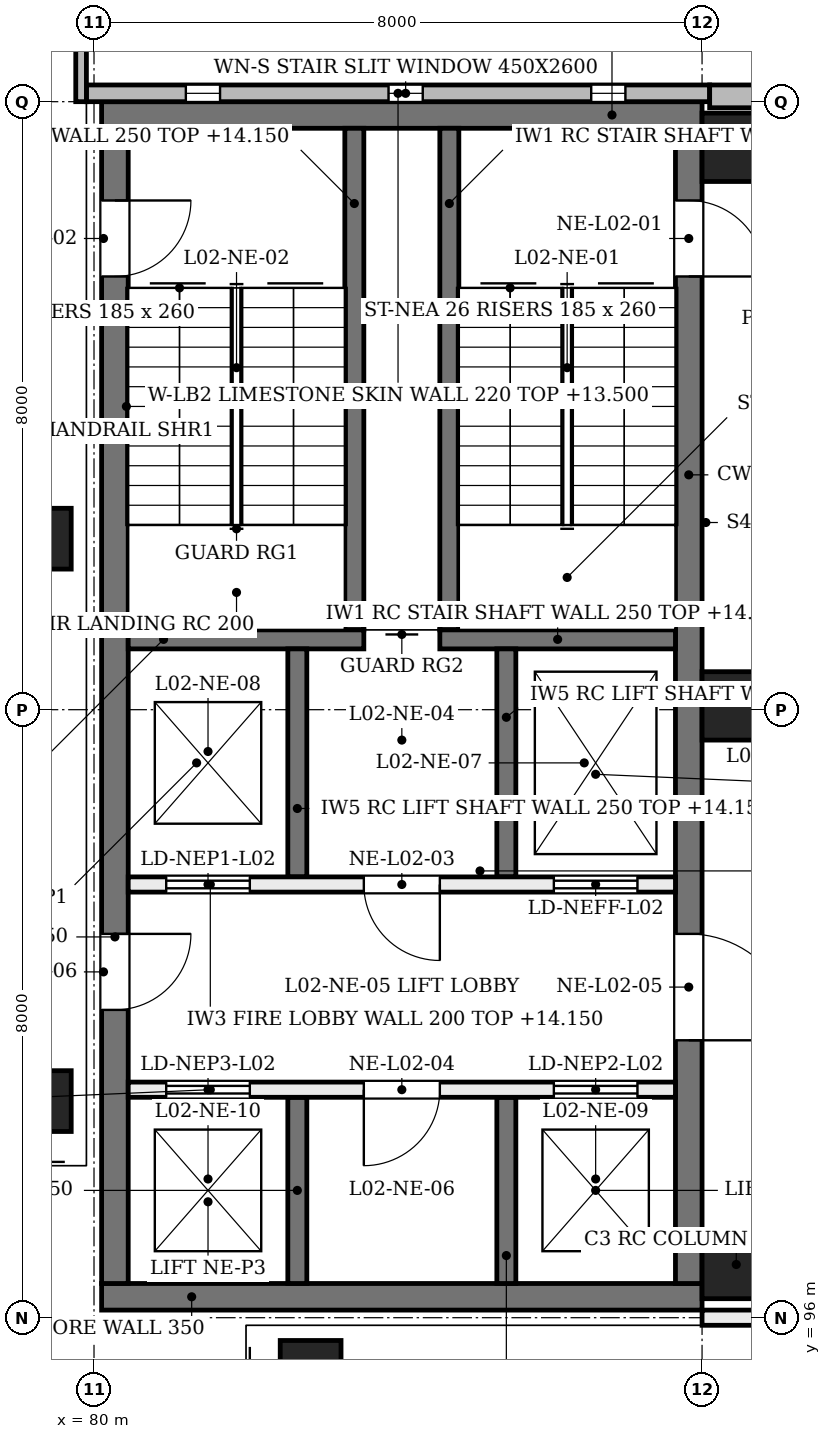
"""IFC4 building model, lengths in metres.
Left out: names, types, materials, properties, quantities, classifications, styles, units other than length and angle.
Written with IfcOpenShell. Run it as: python <this file> out.ifc"""

import sys

from ifc_helpers import new_model, si_unit, direction, frame, frame_2d, origin, origin_2d, place, context, subcontext, project, spatial, rectangle, extrude, element, fill, save


model = new_model("IFC4")
c1 = context("Model", 3, precision=1e-05, world=origin(), true_north=direction((0.0, 1.0)))
c2 = subcontext(c1, "Body", "Model", "MODEL_VIEW")
j1 = project(units=[si_unit("LENGTHUNIT", "METRE"), si_unit("PLANEANGLEUNIT", "RADIAN")], contexts=[c1])
p1 = place(None, origin())
s1 = spatial("IfcSite", under=j1, at=p1, CompositionType="ELEMENT")
p2 = place(p1, origin())
s2 = spatial("IfcBuilding", under=s1, at=p2, CompositionType="ELEMENT")
p3 = place(p2, frame((0.0, 0.0, 9.6)))
s3 = spatial("IfcBuildingStorey", under=s2, at=p3, CompositionType="ELEMENT", Elevation=9.6)
for number, where, z_axis, x_axis in (
    (1, (80.1, 96.275, 0.0), (0.0, 0.0, 1.0), (1.0, 0.0, 0.0)),
    (2, (80.1, 111.825, 0.0), (0.0, 0.0, 1.0), (1.0, 0.0, 0.0)),
):
    element("IfcWall", number, at=place(p3, frame(where, z_axis=z_axis, x_axis=x_axis)), inside=s3, PredefinedType="SHEAR", context=c2, shape_type="SweptSolid", body=[
        extrude(rectangle(XDim=7.9, YDim=0.35, at=frame_2d((3.95, 0.0))), origin(), (0.0, 0.0, 1.0), 4.58),
    ])
p4 = place(p3, frame((80.275, 96.45, 0.0), z_axis=(0.0, 0.0, 1.0), x_axis=(0.0, 1.0, 0.0)))
e3 = element("IfcWall", 3, at=p4, inside=s3, PredefinedType="SHEAR", context=c2, shape_type="SweptSolid", body=[
    extrude(rectangle(XDim=15.2, YDim=0.35, at=frame_2d((7.6, 0.0))), origin(), (0.0, 0.0, 1.0), 4.58),
])
p5 = place(p4, frame((13.25, 0.0, 0.0)))
e4 = element("IfcOpeningElement", 4, at=p5, cuts=e3, PredefinedType="OPENING", context=c2, shape_type="SweptSolid", body=[
    extrude(rectangle(XDim=1.0, YDim=2.1, at=frame_2d((0.5, 1.05))), frame((0.0, 0.185, 0.0), z_axis=(0.0, -1.0, 0.0), x_axis=(1.0, 0.0, 0.0)), (0.0, 0.0, 1.0), 0.37),
])
p6 = place(p4, frame((3.6, 0.0, 0.0)))
e5 = element("IfcOpeningElement", 5, at=p6, cuts=e3, PredefinedType="OPENING", context=c2, shape_type="SweptSolid", body=[
    extrude(rectangle(XDim=1.0, YDim=2.1, at=frame_2d((0.5, 1.05))), frame((0.0, 0.185, 0.0), z_axis=(0.0, -1.0, 0.0), x_axis=(1.0, 0.0, 0.0)), (0.0, 0.0, 1.0), 0.37),
])
p7 = place(p3, frame((87.825, 96.45, 0.0), z_axis=(0.0, 0.0, 1.0), x_axis=(0.0, 1.0, 0.0)))
e6 = element("IfcWall", 6, at=p7, inside=s3, PredefinedType="SHEAR", context=c2, shape_type="SweptSolid", body=[
    extrude(rectangle(XDim=15.2, YDim=0.35, at=frame_2d((7.6, 0.0))), origin(), (0.0, 0.0, 1.0), 4.58),
])
p8 = place(p7, frame((13.25, 0.0, 0.0)))
e7 = element("IfcOpeningElement", 7, at=p8, cuts=e6, PredefinedType="OPENING", context=c2, shape_type="SweptSolid", body=[
    extrude(rectangle(XDim=1.0, YDim=2.1, at=frame_2d((0.5, 1.05))), frame((0.0, 0.185, 0.0), z_axis=(0.0, -1.0, 0.0), x_axis=(1.0, 0.0, 0.0)), (0.0, 0.0, 1.0), 0.37),
])
p9 = place(p7, frame((3.2, 0.0, 0.0)))
e8 = element("IfcOpeningElement", 8, at=p9, cuts=e6, PredefinedType="OPENING", context=c2, shape_type="SweptSolid", body=[
    extrude(rectangle(XDim=1.4, YDim=2.1, at=frame_2d((0.7, 1.05))), frame((0.0, 0.185, 0.0), z_axis=(0.0, -1.0, 0.0), x_axis=(1.0, 0.0, 0.0)), (0.0, 0.0, 1.0), 0.37),
])
for number, where, z_axis, x_axis in (
    (9, (88.45, 96.7, 0.0), (0.0, 0.0, 1.0), (1.0, 0.0, 0.0)),
    (10, (88.45, 104.05, 0.0), (0.0, 0.0, 1.0), (1.0, 0.0, 0.0)),
    (11, (88.45, 111.4, 0.0), (0.0, 0.0, 1.0), (1.0, 0.0, 0.0)),
):
    element("IfcColumn", number, at=place(p3, frame(where, z_axis=z_axis, x_axis=x_axis)), inside=s3, PredefinedType="COLUMN", context=c2, shape_type="SweptSolid", body=[
        extrude(rectangle(XDim=0.9, YDim=0.9, at=origin_2d()), origin(), (0.0, 0.0, 1.0), 4.8),
    ])
for number, where, z_axis, x_axis in (
    (12, (79.3, 98.6, 0.0), (0.0, 0.204, 0.979), (-1.0, 0.0, 0.0)),
    (13, (79.3, 106.0, 0.0), (0.0, 0.204, 0.979), (-1.0, 0.0, 0.0)),
    (14, (82.6, 95.3, 0.0), (0.204, 0.0, 0.979), (0.0, 1.0, 0.0)),
):
    element("IfcColumn", number, at=place(p3, frame(where, z_axis=z_axis, x_axis=x_axis)), inside=s3, PredefinedType="COLUMN", context=c2, shape_type="SweptSolid", body=[
        extrude(rectangle(XDim=0.8, YDim=0.8, at=origin_2d()), origin(), (0.0, 0.0, 1.0), 4.903),
    ])
p10 = place(p3, frame((79.9, 112.11, 0.0), z_axis=(0.0, 0.0, 1.0), x_axis=(1.0, 0.0, 0.0)))
e15 = element("IfcWall", 15, at=p10, inside=s3, PredefinedType="SOLIDWALL", context=c2, shape_type="SweptSolid", body=[
    extrude(rectangle(XDim=8.2, YDim=0.22, at=frame_2d((4.1, 0.0))), origin(), (0.0, 0.0, 1.0), 3.9),
])
p11 = place(p10, frame((1.308, 0.0, 0.9)))
e16 = element("IfcOpeningElement", 16, at=p11, cuts=e15, PredefinedType="OPENING", context=c2, shape_type="SweptSolid", body=[
    extrude(rectangle(XDim=0.45, YDim=2.6, at=frame_2d((0.225, 1.3))), frame((0.0, 0.12, 0.0), z_axis=(0.0, -1.0, 0.0), x_axis=(1.0, 0.0, 0.0)), (0.0, 0.0, 1.0), 0.24),
])
p12 = place(p10, frame((3.975, 0.0, 0.9)))
e17 = element("IfcOpeningElement", 17, at=p12, cuts=e15, PredefinedType="OPENING", context=c2, shape_type="SweptSolid", body=[
    extrude(rectangle(XDim=0.45, YDim=2.6, at=frame_2d((0.225, 1.3))), frame((0.0, 0.12, 0.0), z_axis=(0.0, -1.0, 0.0), x_axis=(1.0, 0.0, 0.0)), (0.0, 0.0, 1.0), 0.24),
])
p13 = place(p10, frame((6.642, 0.0, 0.9)))
e18 = element("IfcOpeningElement", 18, at=p13, cuts=e15, PredefinedType="OPENING", context=c2, shape_type="SweptSolid", body=[
    extrude(rectangle(XDim=0.45, YDim=2.6, at=frame_2d((0.225, 1.3))), frame((0.0, 0.12, 0.0), z_axis=(0.0, -1.0, 0.0), x_axis=(1.0, 0.0, 0.0)), (0.0, 0.0, 1.0), 0.24),
])
p14 = place(p3, frame((88.1, 112.07, 0.0), z_axis=(0.0, 0.0, 1.0), x_axis=(1.0, 0.0, 0.0)))
e19 = element("IfcWall", 19, at=p14, inside=s3, PredefinedType="SOLIDWALL", context=c2, shape_type="SweptSolid", body=[
    extrude(rectangle(XDim=7.9, YDim=0.3, at=frame_2d((3.95, 0.0))), origin(), (0.0, 0.0, 1.0), 3.9),
])
p15 = place(p14, frame((0.717, 0.0, 0.75)))
e20 = element("IfcOpeningElement", 20, at=p15, cuts=e19, PredefinedType="OPENING", context=c2, shape_type="SweptSolid", body=[
    extrude(rectangle(XDim=1.2, YDim=3.1, at=frame_2d((0.6, 1.55))), frame((0.0, 0.16, 0.0), z_axis=(0.0, -1.0, 0.0), x_axis=(1.0, 0.0, 0.0)), (0.0, 0.0, 1.0), 0.32),
])
p16 = place(p14, frame((3.35, 0.0, 0.75)))
e21 = element("IfcOpeningElement", 21, at=p16, cuts=e19, PredefinedType="OPENING", context=c2, shape_type="SweptSolid", body=[
    extrude(rectangle(XDim=1.2, YDim=3.1, at=frame_2d((0.6, 1.55))), frame((0.0, 0.16, 0.0), z_axis=(0.0, -1.0, 0.0), x_axis=(1.0, 0.0, 0.0)), (0.0, 0.0, 1.0), 0.32),
])
p17 = place(p14, frame((5.983, 0.0, 0.75)))
e22 = element("IfcOpeningElement", 22, at=p17, cuts=e19, PredefinedType="OPENING", context=c2, shape_type="SweptSolid", body=[
    extrude(rectangle(XDim=1.2, YDim=3.1, at=frame_2d((0.6, 1.55))), frame((0.0, 0.16, 0.0), z_axis=(0.0, -1.0, 0.0), x_axis=(1.0, 0.0, 0.0)), (0.0, 0.0, 1.0), 0.32),
])
p18 = place(p3, frame((79.83, 112.0, 0.0), z_axis=(0.0, 0.0, 1.0), x_axis=(0.0, 1.0, 0.0)))
e23 = element("IfcWall", 23, at=p18, inside=s3, PredefinedType="SOLIDWALL", context=c2, shape_type="SweptSolid", body=[
    extrude(rectangle(XDim=2.0, YDim=0.14, at=frame_2d((1.0, 0.0))), origin(), (0.0, 0.0, 1.0), 3.9),
])
for number, where, z_axis, x_axis in (
    (24, (84.675, 111.65, 0.0), (0.0, 0.0, 1.0), (0.0, -1.0, 0.0)),
    (25, (83.425, 111.65, 0.0), (0.0, 0.0, 1.0), (0.0, -1.0, 0.0)),
):
    element("IfcWall", number, at=place(p3, frame(where, z_axis=z_axis, x_axis=x_axis)), inside=s3, PredefinedType="SOLIDWALL", context=c2, shape_type="SweptSolid", body=[
        extrude(rectangle(XDim=6.6, YDim=0.25, at=frame_2d((3.3, 0.0))), origin(), (0.0, 0.0, 1.0), 4.55),
    ])
p19 = place(p3, frame((87.65, 104.925, 0.0), z_axis=(0.0, 0.0, 1.0), x_axis=(-1.0, 0.0, 0.0)))
e26 = element("IfcWall", 26, at=p19, inside=s3, PredefinedType="SOLIDWALL", context=c2, shape_type="SweptSolid", body=[
    extrude(rectangle(XDim=3.1, YDim=0.25, at=frame_2d((1.55, 0.0))), origin(), (0.0, 0.0, 1.0), 4.55),
])
p20 = place(p3, frame((83.55, 104.925, 0.0), z_axis=(0.0, 0.0, 1.0), x_axis=(-1.0, 0.0, 0.0)))
e27 = element("IfcWall", 27, at=p20, inside=s3, PredefinedType="SOLIDWALL", context=c2, shape_type="SweptSolid", body=[
    extrude(rectangle(XDim=3.1, YDim=0.25, at=frame_2d((1.55, 0.0))), origin(), (0.0, 0.0, 1.0), 4.55),
])
p21 = place(p3, frame((85.425, 104.8, 0.0), z_axis=(0.0, 0.0, 1.0), x_axis=(0.0, -1.0, 0.0)))
e28 = element("IfcWall", 28, at=p21, inside=s3, PredefinedType="SOLIDWALL", context=c2, shape_type="SweptSolid", body=[
    extrude(rectangle(XDim=3.0, YDim=0.25, at=frame_2d((1.5, 0.0))), origin(), (0.0, 0.0, 1.0), 4.55),
])
p22 = place(p3, frame((85.425, 98.9, 0.0), z_axis=(0.0, 0.0, 1.0), x_axis=(0.0, -1.0, 0.0)))
e29 = element("IfcWall", 29, at=p22, inside=s3, PredefinedType="SOLIDWALL", context=c2, shape_type="SweptSolid", body=[
    extrude(rectangle(XDim=2.45, YDim=0.25, at=frame_2d((1.225, 0.0))), origin(), (0.0, 0.0, 1.0), 4.55),
])
p23 = place(p3, frame((82.675, 104.8, 0.0), z_axis=(0.0, 0.0, 1.0), x_axis=(0.0, -1.0, 0.0)))
e30 = element("IfcWall", 30, at=p23, inside=s3, PredefinedType="SOLIDWALL", context=c2, shape_type="SweptSolid", body=[
    extrude(rectangle(XDim=3.0, YDim=0.25, at=frame_2d((1.5, 0.0))), origin(), (0.0, 0.0, 1.0), 4.55),
])
p24 = place(p3, frame((82.675, 98.9, 0.0), z_axis=(0.0, 0.0, 1.0), x_axis=(0.0, -1.0, 0.0)))
e31 = element("IfcWall", 31, at=p24, inside=s3, PredefinedType="SOLIDWALL", context=c2, shape_type="SweptSolid", body=[
    extrude(rectangle(XDim=2.45, YDim=0.25, at=frame_2d((1.225, 0.0))), origin(), (0.0, 0.0, 1.0), 4.55),
])
p25 = place(p3, frame((87.65, 101.7, 0.0), z_axis=(0.0, 0.0, 1.0), x_axis=(-1.0, 0.0, 0.0)))
e32 = element("IfcWall", 32, at=p25, inside=s3, PredefinedType="SOLIDWALL", context=c2, shape_type="SweptSolid", body=[
    extrude(rectangle(XDim=7.2, YDim=0.2, at=frame_2d((3.6, 0.0))), origin(), (0.0, 0.0, 1.0), 4.55),
])
p26 = place(p25, frame((0.5, 0.0, 0.0)))
e33 = element("IfcOpeningElement", 33, at=p26, cuts=e32, PredefinedType="OPENING", context=c2, shape_type="SweptSolid", body=[
    extrude(rectangle(XDim=1.1, YDim=2.1, at=frame_2d((0.55, 1.05))), frame((0.0, 0.11, 0.0), z_axis=(0.0, -1.0, 0.0), x_axis=(1.0, 0.0, 0.0)), (0.0, 0.0, 1.0), 0.22),
])
p27 = place(p25, frame((5.6, 0.0, 0.0)))
e34 = element("IfcOpeningElement", 34, at=p27, cuts=e32, PredefinedType="OPENING", context=c2, shape_type="SweptSolid", body=[
    extrude(rectangle(XDim=1.1, YDim=2.1, at=frame_2d((0.55, 1.05))), frame((0.0, 0.11, 0.0), z_axis=(0.0, -1.0, 0.0), x_axis=(1.0, 0.0, 0.0)), (0.0, 0.0, 1.0), 0.22),
])
p28 = place(p25, frame((3.1, 0.0, 0.0)))
e35 = element("IfcOpeningElement", 35, at=p28, cuts=e32, PredefinedType="OPENING", context=c2, shape_type="SweptSolid", body=[
    extrude(rectangle(XDim=1.0, YDim=2.1, at=frame_2d((0.5, 1.05))), frame((0.0, 0.11, 0.0), z_axis=(0.0, -1.0, 0.0), x_axis=(1.0, 0.0, 0.0)), (0.0, 0.0, 1.0), 0.22),
])
p29 = place(p3, frame((87.65, 99.0, 0.0), z_axis=(0.0, 0.0, 1.0), x_axis=(-1.0, 0.0, 0.0)))
e36 = element("IfcWall", 36, at=p29, inside=s3, PredefinedType="SOLIDWALL", context=c2, shape_type="SweptSolid", body=[
    extrude(rectangle(XDim=7.2, YDim=0.2, at=frame_2d((3.6, 0.0))), origin(), (0.0, 0.0, 1.0), 4.55),
])
p30 = place(p29, frame((0.5, 0.0, 0.0)))
e37 = element("IfcOpeningElement", 37, at=p30, cuts=e36, PredefinedType="OPENING", context=c2, shape_type="SweptSolid", body=[
    extrude(rectangle(XDim=1.1, YDim=2.1, at=frame_2d((0.55, 1.05))), frame((0.0, 0.11, 0.0), z_axis=(0.0, -1.0, 0.0), x_axis=(1.0, 0.0, 0.0)), (0.0, 0.0, 1.0), 0.22),
])
p31 = place(p29, frame((5.6, 0.0, 0.0)))
e38 = element("IfcOpeningElement", 38, at=p31, cuts=e36, PredefinedType="OPENING", context=c2, shape_type="SweptSolid", body=[
    extrude(rectangle(XDim=1.1, YDim=2.1, at=frame_2d((0.55, 1.05))), frame((0.0, 0.11, 0.0), z_axis=(0.0, -1.0, 0.0), x_axis=(1.0, 0.0, 0.0)), (0.0, 0.0, 1.0), 0.22),
])
p32 = place(p29, frame((3.1, 0.0, 0.0)))
e39 = element("IfcOpeningElement", 39, at=p32, cuts=e36, PredefinedType="OPENING", context=c2, shape_type="SweptSolid", body=[
    extrude(rectangle(XDim=1.0, YDim=2.1, at=frame_2d((0.5, 1.05))), frame((0.0, 0.11, 0.0), z_axis=(0.0, -1.0, 0.0), x_axis=(1.0, 0.0, 0.0)), (0.0, 0.0, 1.0), 0.22),
])
p33 = place(p3, frame((88.0, 96.0, 0.0), z_axis=(0.0, 0.0, 1.0), x_axis=(1.0, 0.0, 0.0)))
e40 = element("IfcWall", 40, at=p33, inside=s3, PredefinedType="PARTITIONING", context=c2, shape_type="SweptSolid", body=[
    extrude(rectangle(XDim=3.6, YDim=0.2, at=frame_2d((1.8, 0.0))), origin(), (0.0, 0.0, 1.0), 3.88),
])
p34 = place(p33, frame((0.9, 0.0, 0.0)))
e41 = element("IfcOpeningElement", 41, at=p34, cuts=e40, PredefinedType="OPENING", context=c2, shape_type="SweptSolid", body=[
    extrude(rectangle(XDim=0.9, YDim=2.1, at=frame_2d((0.45, 1.05))), frame((0.0, 0.11, 0.0), z_axis=(0.0, -1.0, 0.0), x_axis=(1.0, 0.0, 0.0)), (0.0, 0.0, 1.0), 0.22),
])
p35 = place(p11, origin())
e42 = element("IfcWindow", 42, at=p35, inside=s3, PartitioningType="SINGLE_PANEL", PredefinedType="WINDOW", context=c2, shape_type="SweptSolid", body=[
    extrude(rectangle(XDim=0.45, YDim=2.6, at=frame_2d((0.225, 1.3))), frame((0.0, 0.03, 0.0), z_axis=(0.0, -1.0, 0.0), x_axis=(1.0, 0.0, 0.0)), (0.0, 0.0, 1.0), 0.06),
])
fill(e16, e42)
p36 = place(p12, origin())
e43 = element("IfcWindow", 43, at=p36, inside=s3, PartitioningType="SINGLE_PANEL", PredefinedType="WINDOW", context=c2, shape_type="SweptSolid", body=[
    extrude(rectangle(XDim=0.45, YDim=2.6, at=frame_2d((0.225, 1.3))), frame((0.0, 0.03, 0.0), z_axis=(0.0, -1.0, 0.0), x_axis=(1.0, 0.0, 0.0)), (0.0, 0.0, 1.0), 0.06),
])
fill(e17, e43)
p37 = place(p13, origin())
e44 = element("IfcWindow", 44, at=p37, inside=s3, PartitioningType="SINGLE_PANEL", PredefinedType="WINDOW", context=c2, shape_type="SweptSolid", body=[
    extrude(rectangle(XDim=0.45, YDim=2.6, at=frame_2d((0.225, 1.3))), frame((0.0, 0.03, 0.0), z_axis=(0.0, -1.0, 0.0), x_axis=(1.0, 0.0, 0.0)), (0.0, 0.0, 1.0), 0.06),
])
fill(e18, e44)
p38 = place(p8, frame((1.0, 0.0, 0.0), z_axis=(0.0, 0.0, 1.0), x_axis=(-1.0, 0.0, 0.0)))
e45 = element("IfcDoor", 45, at=p38, inside=s3, OperationType="SINGLE_SWING_LEFT", PredefinedType="DOOR", context=c2, shape_type="SweptSolid", body=[
    extrude(rectangle(XDim=1.0, YDim=2.1, at=frame_2d((0.5, 1.05))), frame((0.0, 0.025, 0.0), z_axis=(0.0, -1.0, 0.0), x_axis=(1.0, 0.0, 0.0)), (0.0, 0.0, 1.0), 0.05),
])
fill(e7, e45)
p39 = place(p5, origin())
e46 = element("IfcDoor", 46, at=p39, inside=s3, OperationType="SINGLE_SWING_RIGHT", PredefinedType="DOOR", context=c2, shape_type="SweptSolid", body=[
    extrude(rectangle(XDim=1.0, YDim=2.1, at=frame_2d((0.5, 1.05))), frame((0.0, 0.025, 0.0), z_axis=(0.0, -1.0, 0.0), x_axis=(1.0, 0.0, 0.0)), (0.0, 0.0, 1.0), 0.05),
])
fill(e4, e46)
p40 = place(p26, origin())
e47 = element("IfcDoor", 47, at=p40, inside=s3, OperationType="DOUBLE_DOOR_SLIDING", PredefinedType="DOOR", context=c2, shape_type="SweptSolid", body=[
    extrude(rectangle(XDim=1.1, YDim=2.1, at=frame_2d((0.55, 1.05))), frame((0.0, 0.025, 0.0), z_axis=(0.0, -1.0, 0.0), x_axis=(1.0, 0.0, 0.0)), (0.0, 0.0, 1.0), 0.05),
])
fill(e33, e47)
p41 = place(p27, origin())
e48 = element("IfcDoor", 48, at=p41, inside=s3, OperationType="DOUBLE_DOOR_SLIDING", PredefinedType="DOOR", context=c2, shape_type="SweptSolid", body=[
    extrude(rectangle(XDim=1.1, YDim=2.1, at=frame_2d((0.55, 1.05))), frame((0.0, 0.025, 0.0), z_axis=(0.0, -1.0, 0.0), x_axis=(1.0, 0.0, 0.0)), (0.0, 0.0, 1.0), 0.05),
])
fill(e34, e48)
p42 = place(p30, frame((1.1, 0.0, 0.0), z_axis=(0.0, 0.0, 1.0), x_axis=(-1.0, 0.0, 0.0)))
e49 = element("IfcDoor", 49, at=p42, inside=s3, OperationType="DOUBLE_DOOR_SLIDING", PredefinedType="DOOR", context=c2, shape_type="SweptSolid", body=[
    extrude(rectangle(XDim=1.1, YDim=2.1, at=frame_2d((0.55, 1.05))), frame((0.0, 0.025, 0.0), z_axis=(0.0, -1.0, 0.0), x_axis=(1.0, 0.0, 0.0)), (0.0, 0.0, 1.0), 0.05),
])
fill(e37, e49)
p43 = place(p31, frame((1.1, 0.0, 0.0), z_axis=(0.0, 0.0, 1.0), x_axis=(-1.0, 0.0, 0.0)))
e50 = element("IfcDoor", 50, at=p43, inside=s3, OperationType="DOUBLE_DOOR_SLIDING", PredefinedType="DOOR", context=c2, shape_type="SweptSolid", body=[
    extrude(rectangle(XDim=1.1, YDim=2.1, at=frame_2d((0.55, 1.05))), frame((0.0, 0.025, 0.0), z_axis=(0.0, -1.0, 0.0), x_axis=(1.0, 0.0, 0.0)), (0.0, 0.0, 1.0), 0.05),
])
fill(e38, e50)
p44 = place(p28, origin())
e51 = element("IfcDoor", 51, at=p44, inside=s3, OperationType="SINGLE_SWING_LEFT", PredefinedType="DOOR", context=c2, shape_type="SweptSolid", body=[
    extrude(rectangle(XDim=1.0, YDim=2.1, at=frame_2d((0.5, 1.05))), frame((0.0, 0.025, 0.0), z_axis=(0.0, -1.0, 0.0), x_axis=(1.0, 0.0, 0.0)), (0.0, 0.0, 1.0), 0.05),
])
fill(e35, e51)
p45 = place(p32, frame((1.0, 0.0, 0.0), z_axis=(0.0, 0.0, 1.0), x_axis=(-1.0, 0.0, 0.0)))
e52 = element("IfcDoor", 52, at=p45, inside=s3, OperationType="SINGLE_SWING_RIGHT", PredefinedType="DOOR", context=c2, shape_type="SweptSolid", body=[
    extrude(rectangle(XDim=1.0, YDim=2.1, at=frame_2d((0.5, 1.05))), frame((0.0, 0.025, 0.0), z_axis=(0.0, -1.0, 0.0), x_axis=(1.0, 0.0, 0.0)), (0.0, 0.0, 1.0), 0.05),
])
fill(e39, e52)
p46 = place(p9, frame((1.4, 0.0, 0.0), z_axis=(0.0, 0.0, 1.0), x_axis=(-1.0, 0.0, 0.0)))
e53 = element("IfcDoor", 53, at=p46, inside=s3, OperationType="SINGLE_SWING_LEFT", PredefinedType="DOOR", context=c2, shape_type="SweptSolid", body=[
    extrude(rectangle(XDim=1.4, YDim=2.1, at=frame_2d((0.7, 1.05))), frame((0.0, 0.025, 0.0), z_axis=(0.0, -1.0, 0.0), x_axis=(1.0, 0.0, 0.0)), (0.0, 0.0, 1.0), 0.05),
])
fill(e8, e53)
p47 = place(p6, origin())
e54 = element("IfcDoor", 54, at=p47, inside=s3, OperationType="SINGLE_SWING_RIGHT", PredefinedType="DOOR", context=c2, shape_type="SweptSolid", body=[
    extrude(rectangle(XDim=1.0, YDim=2.1, at=frame_2d((0.5, 1.05))), frame((0.0, 0.025, 0.0), z_axis=(0.0, -1.0, 0.0), x_axis=(1.0, 0.0, 0.0)), (0.0, 0.0, 1.0), 0.05),
])
fill(e5, e54)
save(model, sys.argv[1])
